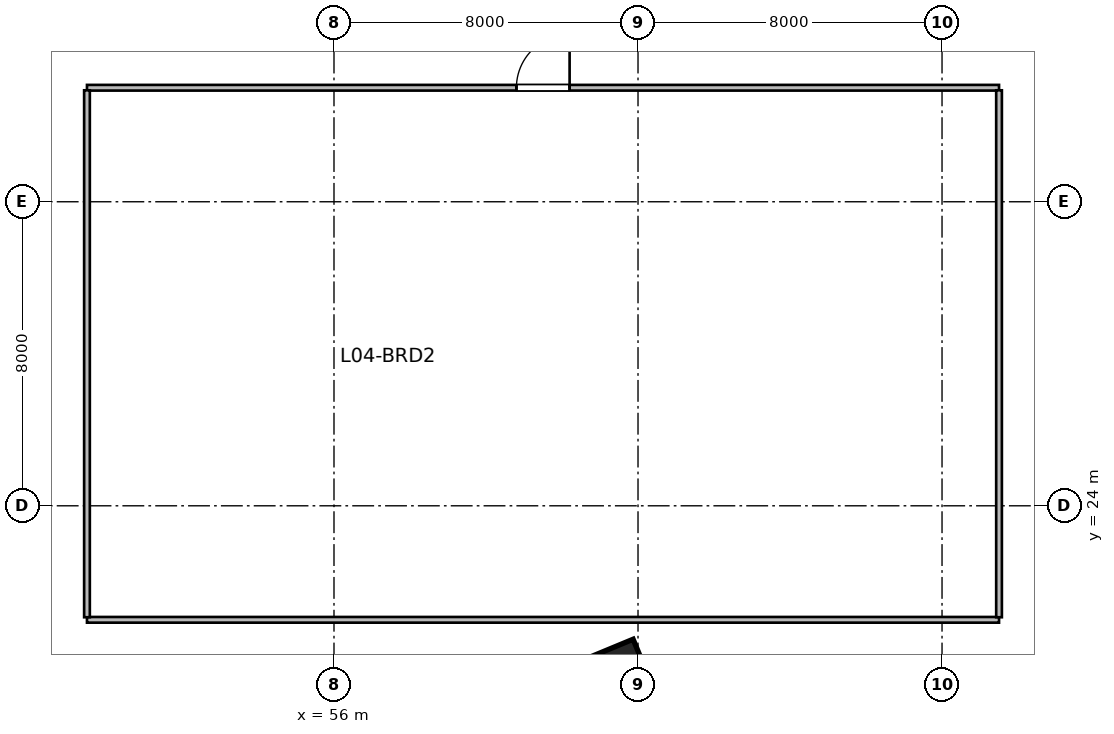
"""IFC4 building model, lengths in metres.
Left out: names, types, materials, properties, quantities, classifications, styles, units other than length and angle.
Written with IfcOpenShell. Run it as: python <this file> out.ifc"""

import sys

from ifc_helpers import new_model, si_unit, direction, frame, frame_2d, origin, origin_2d, place, context, subcontext, project, spatial, rectangle, extrude, source, transform, mapped, element, fill, save


model = new_model("IFC4")
c1 = context("Model", 3, precision=1e-05, world=origin(), true_north=direction((0.0, 1.0)))
c2 = subcontext(c1, "Body", "Model", "MODEL_VIEW")
j1 = project(units=[si_unit("LENGTHUNIT", "METRE"), si_unit("PLANEANGLEUNIT", "RADIAN")], contexts=[c1])
p1 = place(None, origin())
s1 = spatial("IfcSite", under=j1, at=p1, CompositionType="ELEMENT")
p2 = place(p1, origin())
s2 = spatial("IfcBuilding", under=s1, at=p2, CompositionType="ELEMENT")
p3 = place(p2, frame((0.0, 0.0, 24.0)))
s3 = spatial("IfcBuildingStorey", under=s2, at=p3, CompositionType="ELEMENT", Elevation=24.0)
m1 = source(origin(), c2, "Body", "SweptSolid", [
    extrude(rectangle(XDim=1.8, YDim=1.8, at=origin_2d()), origin(), (0.0, 0.0, 1.0), 6.0),
])
p4 = place(p3, frame((63.384, 19.312, 0.0), z_axis=(0.0, 0.0, 1.0), x_axis=(0.382683432365, -0.923879532511, 0.0)))
e1 = element("IfcColumn", 1, at=p4, inside=s3, PredefinedType="COLUMN", context=c2, shape_type="MappedRepresentation", body=[
    mapped(m1, transform((0.0, 0.0, 0.0), scale=1.0)),
])
m2 = source(origin(), c2, "Body", "SweptSolid", [
    extrude(rectangle(XDim=24.0, YDim=0.15, at=frame_2d((12.0, 0.0))), origin(), (0.0, 0.0, 1.0), 4.611),
])
p5 = place(p3, frame((49.5, 21.0, 0.0), z_axis=(0.0, 0.0, 1.0), x_axis=(1.0, 0.0, 0.0)))
e2 = element("IfcWall", 2, at=p5, inside=s3, PredefinedType="PARTITIONING", context=c2, shape_type="MappedRepresentation", body=[
    mapped(m2, transform((0.0, 0.0, 0.0), scale=1.0)),
])
m3 = source(origin(), c2, "Body", "SweptSolid", [
    extrude(rectangle(XDim=24.0, YDim=0.15, at=frame_2d((12.0, 0.0))), origin(), (0.0, 0.0, 1.0), 5.55),
])
p6 = place(p3, frame((49.5, 35.0, 0.0), z_axis=(0.0, 0.0, 1.0), x_axis=(1.0, 0.0, 0.0)))
e3 = element("IfcWall", 3, at=p6, inside=s3, PredefinedType="PARTITIONING", context=c2, shape_type="MappedRepresentation", body=[
    mapped(m3, transform((0.0, 0.0, 0.0), scale=1.0)),
])
p7 = place(p6, frame((11.3, 0.0, 0.0)))
e4 = element("IfcOpeningElement", 4, at=p7, cuts=e3, PredefinedType="OPENING", context=c2, shape_type="SweptSolid", body=[
    extrude(rectangle(XDim=1.4, YDim=2.15, at=frame_2d((0.7, 1.075))), frame((0.0, 0.085, 0.0), z_axis=(0.0, -1.0, 0.0), x_axis=(1.0, 0.0, 0.0)), (0.0, 0.0, 1.0), 0.17),
])
m4 = source(origin(), c2, "Body", "SweptSolid", [
    extrude(rectangle(XDim=13.865, YDim=0.15, at=frame_2d((6.933, 0.0))), origin(), (0.0, 0.0, 1.0), 5.55),
])
p8 = place(p3, frame((49.5, 21.067, 0.0), z_axis=(0.0, 0.0, 1.0), x_axis=(0.0, 1.0, 0.0)))
e5 = element("IfcWall", 5, at=p8, inside=s3, PredefinedType="PARTITIONING", context=c2, shape_type="MappedRepresentation", body=[
    mapped(m4, transform((0.0, 0.0, 0.0), scale=1.0)),
])
m5 = source(origin(), c2, "Body", "SweptSolid", [
    extrude(rectangle(XDim=13.865, YDim=0.15, at=frame_2d((6.933, 0.0))), origin(), (0.0, 0.0, 1.0), 2.66),
])
p9 = place(p3, frame((73.5, 21.067, 0.0), z_axis=(0.0, 0.0, 1.0), x_axis=(0.0, 1.0, 0.0)))
e6 = element("IfcWall", 6, at=p9, inside=s3, PredefinedType="PARTITIONING", context=c2, shape_type="MappedRepresentation", body=[
    mapped(m5, transform((0.0, 0.0, 0.0), scale=1.0)),
])
m6 = source(origin(), c2, "Body", "SweptSolid", [
    extrude(rectangle(XDim=1.4, YDim=2.15, at=frame_2d((0.7, 1.075))), frame((0.0, 0.025, 0.0), z_axis=(0.0, -1.0, 0.0), x_axis=(1.0, 0.0, 0.0)), (0.0, 0.0, 1.0), 0.05),
])
p10 = place(p7, origin())
e7 = element("IfcDoor", 7, at=p10, inside=s3, OperationType="SINGLE_SWING_RIGHT", PredefinedType="DOOR", context=c2, shape_type="MappedRepresentation", body=[
    mapped(m6, transform((0.0, 0.0, 0.0), scale=1.0)),
])
fill(e4, e7)
save(model, sys.argv[1])
